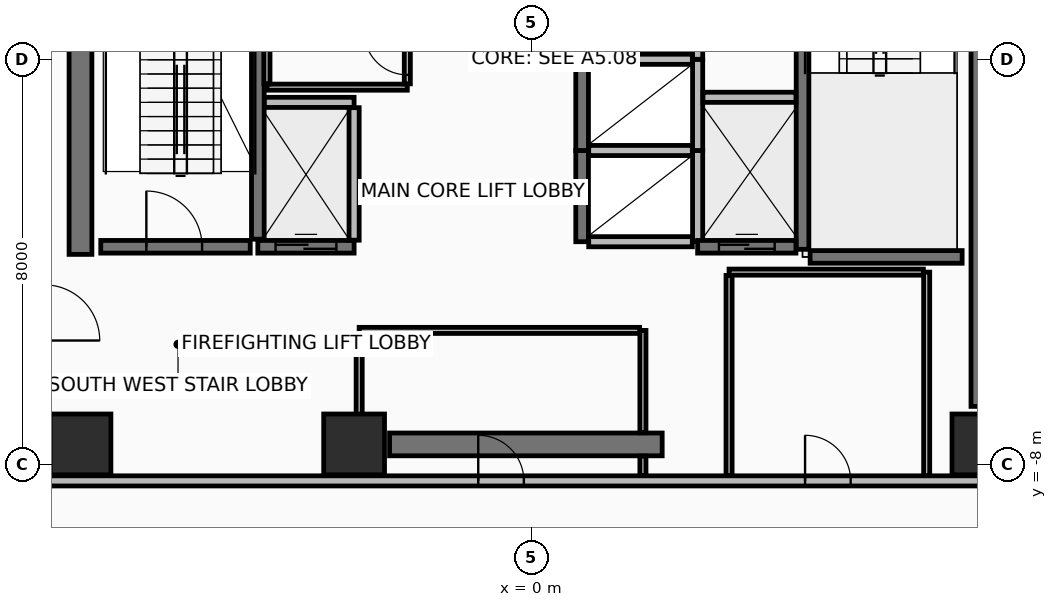
"""IFC4 building model, lengths in metres.
Left out: names, types, materials, properties, quantities, classifications, styles, units other than length and angle.
Written with IfcOpenShell. Run it as: python <this file> out.ifc"""

import sys

from ifc_helpers import new_model, si_unit, direction, frame, frame_2d, origin, origin_2d, place, context, subcontext, project, spatial, rectangle, extrude, element, fill, save


model = new_model("IFC4")
c1 = context("Model", 3, precision=1e-05, world=origin(), true_north=direction((0.0, 1.0)))
c2 = subcontext(c1, "Body", "Model", "MODEL_VIEW")
j1 = project(units=[si_unit("LENGTHUNIT", "METRE"), si_unit("PLANEANGLEUNIT", "RADIAN")], contexts=[c1])
p1 = place(None, origin())
s1 = spatial("IfcSite", under=j1, at=p1, CompositionType="ELEMENT")
p2 = place(p1, origin())
s2 = spatial("IfcBuilding", under=s1, at=p2, CompositionType="ELEMENT")
p3 = place(p2, frame((0.0, 0.0, 138.8)))
s3 = spatial("IfcBuildingStorey", under=s2, at=p3, CompositionType="ELEMENT", Elevation=138.8)
for number, where, z_axis, x_axis in (
    (1, (-8.9, -7.6, 0.0), (0.0, 0.0, 1.0), (1.0, 0.0, 0.0)),
    (2, (-3.5, -7.6, 0.0), (0.0, 0.0, 1.0), (1.0, 0.0, 0.0)),
    (3, (8.9, -7.6, 0.0), (0.0, 0.0, 1.0), (1.0, 0.0, 0.0)),
):
    element("IfcColumn", number, at=place(p3, frame(where, z_axis=z_axis, x_axis=x_axis)), inside=s3, PredefinedType="COLUMN", context=c2, shape_type="SweptSolid", body=[
        extrude(rectangle(XDim=1.2, YDim=1.2, at=origin_2d()), origin(), (0.0, 0.0, 1.0), 3.6),
    ])
p4 = place(p3, frame((-2.8, -7.6, 0.0), z_axis=(0.0, 0.0, 1.0), x_axis=(1.0, 0.0, 0.0)))
e4 = element("IfcWall", 4, at=p4, inside=s3, PredefinedType="SHEAR", context=c2, shape_type="SweptSolid", body=[
    extrude(rectangle(XDim=5.38, YDim=0.45, at=frame_2d((2.69, 0.0))), origin(), (0.0, 0.0, 1.0), 3.41),
])
for number, where, z_axis, x_axis in (
    (5, (-8.9, -3.85, 0.0), (0.0, 0.0, 1.0), (0.0, 1.0, 0.0)),
    (6, (8.9, -6.85, 0.0), (0.0, 0.0, 1.0), (0.0, 1.0, 0.0)),
):
    element("IfcWall", number, at=place(p3, frame(where, z_axis=z_axis, x_axis=x_axis)), inside=s3, PredefinedType="SHEAR", context=c2, shape_type="SweptSolid", body=[
        extrude(rectangle(XDim=10.7, YDim=0.45, at=frame_2d((5.35, 0.0))), origin(), (0.0, 0.0, 1.0), 3.41),
    ])
p5 = place(p3, frame((-9.62, -8.32, 0.0), z_axis=(0.0, 0.0, 1.0), x_axis=(1.0, 0.0, 0.0)))
e7 = element("IfcWall", 7, at=p5, inside=s3, PredefinedType="PARTITIONING", context=c2, shape_type="SweptSolid", body=[
    extrude(rectangle(XDim=19.24, YDim=0.2, at=frame_2d((9.62, 0.0))), origin(), (0.0, 0.0, 1.0), 2.855),
])
p6 = place(p5, frame((8.57, 0.0, 0.0)))
e8 = element("IfcOpeningElement", 8, at=p6, cuts=e7, PredefinedType="OPENING", context=c2, shape_type="SweptSolid", body=[
    extrude(rectangle(XDim=0.9, YDim=2.1, at=frame_2d((0.45, 1.05))), frame((0.0, 0.11, 0.0), z_axis=(0.0, -1.0, 0.0), x_axis=(1.0, 0.0, 0.0)), (0.0, 0.0, 1.0), 0.22),
])
p7 = place(p5, frame((15.02, 0.0, 0.0)))
e9 = element("IfcOpeningElement", 9, at=p7, cuts=e7, PredefinedType="OPENING", context=c2, shape_type="SweptSolid", body=[
    extrude(rectangle(XDim=0.9, YDim=2.1, at=frame_2d((0.45, 1.05))), frame((0.0, 0.11, 0.0), z_axis=(0.0, -1.0, 0.0), x_axis=(1.0, 0.0, 0.0)), (0.0, 0.0, 1.0), 0.22),
])
p8 = place(p3, frame((-5.4, -3.55, 0.0), z_axis=(0.0, 0.0, 1.0), x_axis=(0.0, 1.0, 0.0)))
e10 = element("IfcWall", 10, at=p8, inside=s3, PredefinedType="SHEAR", context=c2, shape_type="SweptSolid", body=[
    extrude(rectangle(XDim=7.3, YDim=0.25, at=frame_2d((3.65, 0.0))), origin(), (0.0, 0.0, 1.0), 3.41),
])
p9 = place(p3, frame((-8.5, -3.7, 0.0), z_axis=(0.0, 0.0, 1.0), x_axis=(1.0, 0.0, 0.0)))
e11 = element("IfcWall", 11, at=p9, inside=s3, PredefinedType="SHEAR", context=c2, shape_type="SweptSolid", body=[
    extrude(rectangle(XDim=2.95, YDim=0.25, at=frame_2d((1.475, 0.0))), origin(), (0.0, 0.0, 1.0), 3.41),
])
p10 = place(p9, frame((0.9, 0.0, 0.0)))
e12 = element("IfcOpeningElement", 12, at=p10, cuts=e11, PredefinedType="OPENING", context=c2, shape_type="SweptSolid", body=[
    extrude(rectangle(XDim=1.1, YDim=2.15, at=frame_2d((0.55, 1.075))), frame((0.0, 0.135, 0.0), z_axis=(0.0, -1.0, 0.0), x_axis=(1.0, 0.0, 0.0)), (0.0, 0.0, 1.0), 0.27),
])
p11 = place(p3, frame((5.35, -3.75, 0.0), z_axis=(0.0, 0.0, 1.0), x_axis=(0.0, 1.0, 0.0)))
e13 = element("IfcWall", 13, at=p11, inside=s3, PredefinedType="SHEAR", context=c2, shape_type="SweptSolid", body=[
    extrude(rectangle(XDim=7.3, YDim=0.25, at=frame_2d((3.65, 0.0))), origin(), (0.0, 0.0, 1.0), 3.41),
])
p12 = place(p3, frame((5.5, -3.9, 0.0), z_axis=(0.0, 0.0, 1.0), x_axis=(1.0, 0.0, 0.0)))
e14 = element("IfcWall", 14, at=p12, inside=s3, PredefinedType="SHEAR", context=c2, shape_type="SweptSolid", body=[
    extrude(rectangle(XDim=3.0, YDim=0.25, at=frame_2d((1.5, 0.0))), origin(), (0.0, 0.0, 1.0), 3.41),
])
p13 = place(p3, frame((1.0, -3.6, 0.0), z_axis=(0.0, 0.0, 1.0), x_axis=(0.0, 1.0, 0.0)))
e15 = element("IfcWall", 15, at=p13, inside=s3, PredefinedType="SHEAR", context=c2, shape_type="SweptSolid", body=[
    extrude(rectangle(XDim=1.8, YDim=0.25, at=frame_2d((0.9, 0.0))), origin(), (0.0, 0.0, 1.0), 3.41),
])
p14 = place(p3, frame((3.28, -3.6, 0.0), z_axis=(0.0, 0.0, 1.0), x_axis=(0.0, 1.0, 0.0)))
e16 = element("IfcWall", 16, at=p14, inside=s3, PredefinedType="PARTITIONING", context=c2, shape_type="SweptSolid", body=[
    extrude(rectangle(XDim=1.8, YDim=0.2, at=frame_2d((0.9, 0.0))), origin(), (0.0, 0.0, 1.0), 3.41),
])
for number, where, z_axis, x_axis in (
    (17, (1.13, -3.6, 0.0), (0.0, 0.0, 1.0), (1.0, 0.0, 0.0)),
    (18, (1.13, -1.8, 0.0), (0.0, 0.0, 1.0), (1.0, 0.0, 0.0)),
):
    element("IfcWall", number, at=place(p3, frame(where, z_axis=z_axis, x_axis=x_axis)), inside=s3, PredefinedType="PARTITIONING", context=c2, shape_type="SweptSolid", body=[
        extrude(rectangle(XDim=2.045, YDim=0.2, at=frame_2d((1.022, 0.0))), origin(), (0.0, 0.0, 1.0), 3.41),
    ])
p15 = place(p3, frame((1.0, -1.8, 0.0), z_axis=(0.0, 0.0, 1.0), x_axis=(0.0, 1.0, 0.0)))
e19 = element("IfcWall", 19, at=p15, inside=s3, PredefinedType="SHEAR", context=c2, shape_type="SweptSolid", body=[
    extrude(rectangle(XDim=1.8, YDim=0.25, at=frame_2d((0.9, 0.0))), origin(), (0.0, 0.0, 1.0), 3.41),
])
p16 = place(p3, frame((3.28, -1.8, 0.0), z_axis=(0.0, 0.0, 1.0), x_axis=(0.0, 1.0, 0.0)))
e20 = element("IfcWall", 20, at=p16, inside=s3, PredefinedType="PARTITIONING", context=c2, shape_type="SweptSolid", body=[
    extrude(rectangle(XDim=1.8, YDim=0.2, at=frame_2d((0.9, 0.0))), origin(), (0.0, 0.0, 1.0), 3.41),
])
p17 = place(p3, frame((1.13, 0.0, 0.0), z_axis=(0.0, 0.0, 1.0), x_axis=(1.0, 0.0, 0.0)))
e21 = element("IfcWall", 21, at=p17, inside=s3, PredefinedType="PARTITIONING", context=c2, shape_type="SweptSolid", body=[
    extrude(rectangle(XDim=2.045, YDim=0.2, at=frame_2d((1.022, 0.0))), origin(), (0.0, 0.0, 1.0), 3.41),
])
p18 = place(p3, frame((1.0, 0.0, 0.0), z_axis=(0.0, 0.0, 1.0), x_axis=(0.0, 1.0, 0.0)))
e22 = element("IfcWall", 22, at=p18, inside=s3, PredefinedType="SHEAR", context=c2, shape_type="SweptSolid", body=[
    extrude(rectangle(XDim=1.8, YDim=0.25, at=frame_2d((0.9, 0.0))), origin(), (0.0, 0.0, 1.0), 3.41),
])
p19 = place(p3, frame((3.28, 0.0, 0.0), z_axis=(0.0, 0.0, 1.0), x_axis=(0.0, 1.0, 0.0)))
e23 = element("IfcWall", 23, at=p19, inside=s3, PredefinedType="PARTITIONING", context=c2, shape_type="SweptSolid", body=[
    extrude(rectangle(XDim=1.8, YDim=0.2, at=frame_2d((0.9, 0.0))), origin(), (0.0, 0.0, 1.0), 3.41),
])
p20 = place(p3, frame((-5.4, -3.7, 0.0), z_axis=(0.0, 0.0, 1.0), x_axis=(1.0, 0.0, 0.0)))
e24 = element("IfcWall", 24, at=p20, inside=s3, PredefinedType="SHEAR", context=c2, shape_type="SweptSolid", body=[
    extrude(rectangle(XDim=1.9, YDim=0.25, at=frame_2d((0.95, 0.0))), origin(), (0.0, 0.0, 1.0), 3.41),
])
p21 = place(p20, frame((0.35, 0.0, 0.0)))
e25 = element("IfcOpeningElement", 25, at=p21, cuts=e24, PredefinedType="OPENING", context=c2, shape_type="SweptSolid", body=[
    extrude(rectangle(XDim=1.2, YDim=2.2, at=frame_2d((0.6, 1.1))), frame((0.0, 0.135, 0.0), z_axis=(0.0, -1.0, 0.0), x_axis=(1.0, 0.0, 0.0)), (0.0, 0.0, 1.0), 0.27),
])
p22 = place(p3, frame((-5.27, -0.85, 0.0), z_axis=(0.0, 0.0, 1.0), x_axis=(1.0, 0.0, 0.0)))
e26 = element("IfcWall", 26, at=p22, inside=s3, PredefinedType="PARTITIONING", context=c2, shape_type="SweptSolid", body=[
    extrude(rectangle(XDim=1.77, YDim=0.2, at=frame_2d((0.885, 0.0))), origin(), (0.0, 0.0, 1.0), 3.41),
])
p23 = place(p3, frame((-3.5, -3.57, 0.0), z_axis=(0.0, 0.0, 1.0), x_axis=(0.0, 1.0, 0.0)))
e27 = element("IfcWall", 27, at=p23, inside=s3, PredefinedType="PARTITIONING", context=c2, shape_type="SweptSolid", body=[
    extrude(rectangle(XDim=2.615, YDim=0.2, at=frame_2d((1.308, 0.0))), origin(), (0.0, 0.0, 1.0), 3.41),
])
p24 = place(p3, frame((3.28, -3.7, 0.0), z_axis=(0.0, 0.0, 1.0), x_axis=(1.0, 0.0, 0.0)))
e28 = element("IfcWall", 28, at=p24, inside=s3, PredefinedType="SHEAR", context=c2, shape_type="SweptSolid", body=[
    extrude(rectangle(XDim=1.94, YDim=0.25, at=frame_2d((0.97, 0.0))), origin(), (0.0, 0.0, 1.0), 3.41),
])
p25 = place(p24, frame((0.42, 0.0, 0.0)))
e29 = element("IfcOpeningElement", 29, at=p25, cuts=e28, PredefinedType="OPENING", context=c2, shape_type="SweptSolid", body=[
    extrude(rectangle(XDim=1.1, YDim=2.2, at=frame_2d((0.55, 1.1))), frame((0.0, 0.135, 0.0), z_axis=(0.0, -1.0, 0.0), x_axis=(1.0, 0.0, 0.0)), (0.0, 0.0, 1.0), 0.27),
])
p26 = place(p3, frame((3.385, -0.75, 0.0), z_axis=(0.0, 0.0, 1.0), x_axis=(1.0, 0.0, 0.0)))
e30 = element("IfcWall", 30, at=p26, inside=s3, PredefinedType="PARTITIONING", context=c2, shape_type="SweptSolid", body=[
    extrude(rectangle(XDim=1.835, YDim=0.2, at=frame_2d((0.917, 0.0))), origin(), (0.0, 0.0, 1.0), 3.41),
])
p27 = place(p3, frame((-5.22, -0.55, 0.0), z_axis=(0.0, 0.0, 1.0), x_axis=(1.0, 0.0, 0.0)))
e31 = element("IfcWall", 31, at=p27, inside=s3, PredefinedType="PARTITIONING", context=c2, shape_type="SweptSolid", body=[
    extrude(rectangle(XDim=2.77, YDim=0.12, at=frame_2d((1.385, 0.0))), origin(), (0.0, 0.0, 1.0), 3.41),
])
p28 = place(p3, frame((-2.45, -0.485, 0.0), z_axis=(0.0, 0.0, 1.0), x_axis=(0.0, 1.0, 0.0)))
e32 = element("IfcWall", 32, at=p28, inside=s3, PredefinedType="PARTITIONING", context=c2, shape_type="SweptSolid", body=[
    extrude(rectangle(XDim=1.205, YDim=0.12, at=frame_2d((0.603, 0.0))), origin(), (0.0, 0.0, 1.0), 3.41),
])
p29 = place(p28, frame((0.178, 0.0, 0.0)))
e33 = element("IfcOpeningElement", 33, at=p29, cuts=e32, PredefinedType="OPENING", context=c2, shape_type="SweptSolid", body=[
    extrude(rectangle(XDim=0.85, YDim=2.1, at=frame_2d((0.425, 1.05))), frame((0.0, 0.07, 0.0), z_axis=(0.0, -1.0, 0.0), x_axis=(1.0, 0.0, 0.0)), (0.0, 0.0, 1.0), 0.14),
])
p30 = place(p3, frame((-5.22, 0.655, 0.0), z_axis=(0.0, 0.0, 1.0), x_axis=(0.0, -1.0, 0.0)))
e34 = element("IfcWall", 34, at=p30, inside=s3, PredefinedType="PARTITIONING", context=c2, shape_type="SweptSolid", body=[
    extrude(rectangle(XDim=1.14, YDim=0.12, at=frame_2d((0.57, 0.0))), origin(), (0.0, 0.0, 1.0), 3.41),
])
p31 = place(p3, frame((2.2, -8.215, 0.0), z_axis=(0.0, 0.0, 1.0), x_axis=(0.0, 1.0, 0.0)))
e35 = element("IfcWall", 35, at=p31, inside=s3, PredefinedType="PARTITIONING", context=c2, shape_type="SweptSolid", body=[
    extrude(rectangle(XDim=0.385, YDim=0.12, at=frame_2d((0.192, 0.0))), origin(), (0.0, 0.0, 1.0), 2.605),
])
p32 = place(p3, frame((2.2, -7.37, 0.0), z_axis=(0.0, 0.0, 1.0), x_axis=(0.0, 1.0, 0.0)))
e36 = element("IfcWall", 36, at=p32, inside=s3, PredefinedType="PARTITIONING", context=c2, shape_type="SweptSolid", body=[
    extrude(rectangle(XDim=2.02, YDim=0.12, at=frame_2d((1.01, 0.0))), origin(), (0.0, 0.0, 1.0), 2.605),
])
p33 = place(p3, frame((2.135, -5.35, 0.0), z_axis=(0.0, 0.0, 1.0), x_axis=(-1.0, 0.0, 0.0)))
e37 = element("IfcWall", 37, at=p33, inside=s3, PredefinedType="PARTITIONING", context=c2, shape_type="SweptSolid", body=[
    extrude(rectangle(XDim=5.535, YDim=0.12, at=frame_2d((2.768, 0.0))), origin(), (0.0, 0.0, 1.0), 2.605),
])
p34 = place(p3, frame((-3.4, -5.415, 0.0), z_axis=(0.0, 0.0, 1.0), x_axis=(0.0, -1.0, 0.0)))
e38 = element("IfcWall", 38, at=p34, inside=s3, PredefinedType="PARTITIONING", context=c2, shape_type="SweptSolid", body=[
    extrude(rectangle(XDim=2.8, YDim=0.12, at=frame_2d((1.4, 0.0))), origin(), (0.0, 0.0, 1.0), 2.605),
])
p35 = place(p3, frame((7.8, -8.215, 0.0), z_axis=(0.0, 0.0, 1.0), x_axis=(0.0, 1.0, 0.0)))
e39 = element("IfcWall", 39, at=p35, inside=s3, PredefinedType="PARTITIONING", context=c2, shape_type="SweptSolid", body=[
    extrude(rectangle(XDim=4.015, YDim=0.12, at=frame_2d((2.008, 0.0))), origin(), (0.0, 0.0, 1.0), 2.605),
])
p36 = place(p3, frame((7.735, -4.2, 0.0), z_axis=(0.0, 0.0, 1.0), x_axis=(-1.0, 0.0, 0.0)))
e40 = element("IfcWall", 40, at=p36, inside=s3, PredefinedType="PARTITIONING", context=c2, shape_type="SweptSolid", body=[
    extrude(rectangle(XDim=3.835, YDim=0.12, at=frame_2d((1.917, 0.0))), origin(), (0.0, 0.0, 1.0), 3.41),
])
p37 = place(p3, frame((3.9, -4.265, 0.0), z_axis=(0.0, 0.0, 1.0), x_axis=(0.0, -1.0, 0.0)))
e41 = element("IfcWall", 41, at=p37, inside=s3, PredefinedType="PARTITIONING", context=c2, shape_type="SweptSolid", body=[
    extrude(rectangle(XDim=3.95, YDim=0.12, at=frame_2d((1.975, 0.0))), origin(), (0.0, 0.0, 1.0), 2.605),
])
p38 = place(p10, origin())
e42 = element("IfcDoor", 42, at=p38, inside=s3, OperationType="SINGLE_SWING_LEFT", PredefinedType="DOOR", context=c2, shape_type="SweptSolid", body=[
    extrude(rectangle(XDim=1.1, YDim=2.15, at=frame_2d((0.55, 1.075))), frame((0.0, 0.025, 0.0), z_axis=(0.0, -1.0, 0.0), x_axis=(1.0, 0.0, 0.0)), (0.0, 0.0, 1.0), 0.05),
])
fill(e12, e42)
p39 = place(p21, origin())
e43 = element("IfcDoor", 43, at=p39, inside=s3, OperationType="SLIDING_TO_RIGHT", PredefinedType="DOOR", context=c2, shape_type="SweptSolid", body=[
    extrude(rectangle(XDim=1.2, YDim=2.2, at=frame_2d((0.6, 1.1))), frame((0.0, 0.025, 0.0), z_axis=(0.0, -1.0, 0.0), x_axis=(1.0, 0.0, 0.0)), (0.0, 0.0, 1.0), 0.05),
])
fill(e25, e43)
p40 = place(p25, origin())
e44 = element("IfcDoor", 44, at=p40, inside=s3, OperationType="SLIDING_TO_LEFT", PredefinedType="DOOR", context=c2, shape_type="SweptSolid", body=[
    extrude(rectangle(XDim=1.1, YDim=2.2, at=frame_2d((0.55, 1.1))), frame((0.0, 0.025, 0.0), z_axis=(0.0, -1.0, 0.0), x_axis=(1.0, 0.0, 0.0)), (0.0, 0.0, 1.0), 0.05),
])
fill(e29, e44)
p41 = place(p29, frame((0.85, 0.0, 0.0), z_axis=(0.0, 0.0, 1.0), x_axis=(-1.0, 0.0, 0.0)))
e45 = element("IfcDoor", 45, at=p41, inside=s3, OperationType="SINGLE_SWING_RIGHT", PredefinedType="DOOR", context=c2, shape_type="SweptSolid", body=[
    extrude(rectangle(XDim=0.85, YDim=2.1, at=frame_2d((0.425, 1.05))), frame((0.0, 0.025, 0.0), z_axis=(0.0, -1.0, 0.0), x_axis=(1.0, 0.0, 0.0)), (0.0, 0.0, 1.0), 0.05),
])
fill(e33, e45)
p42 = place(p6, origin())
e46 = element("IfcDoor", 46, at=p42, inside=s3, OperationType="SINGLE_SWING_LEFT", PredefinedType="DOOR", context=c2, shape_type="SweptSolid", body=[
    extrude(rectangle(XDim=0.9, YDim=2.1, at=frame_2d((0.45, 1.05))), frame((0.0, 0.025, 0.0), z_axis=(0.0, -1.0, 0.0), x_axis=(1.0, 0.0, 0.0)), (0.0, 0.0, 1.0), 0.05),
])
fill(e8, e46)
p43 = place(p7, origin())
e47 = element("IfcDoor", 47, at=p43, inside=s3, OperationType="SINGLE_SWING_LEFT", PredefinedType="DOOR", context=c2, shape_type="SweptSolid", body=[
    extrude(rectangle(XDim=0.9, YDim=2.1, at=frame_2d((0.45, 1.05))), frame((0.0, 0.025, 0.0), z_axis=(0.0, -1.0, 0.0), x_axis=(1.0, 0.0, 0.0)), (0.0, 0.0, 1.0), 0.05),
])
fill(e9, e47)
save(model, sys.argv[1])
